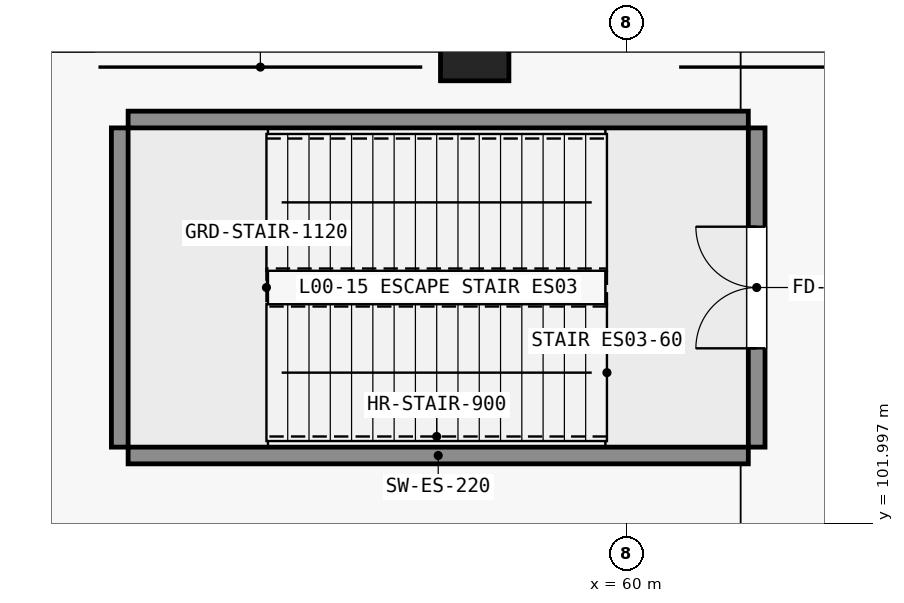
"""IFC4 building model, lengths in metres.
Left out: names, types, materials, properties, quantities, classifications, styles, units other than length and angle.
Written with IfcOpenShell. Run it as: python <this file> out.ifc"""

import sys

from ifc_helpers import new_model, si_unit, direction, frame, frame_2d, origin, origin_2d, place, context, subcontext, project, spatial, rectangle, extrude, element, fill, save


model = new_model("IFC4")
c1 = context("Model", 3, precision=1e-05, world=origin(), true_north=direction((0.0, 1.0)))
c2 = subcontext(c1, "Body", "Model", "MODEL_VIEW")
j1 = project(units=[si_unit("LENGTHUNIT", "METRE"), si_unit("PLANEANGLEUNIT", "RADIAN")], contexts=[c1])
p1 = place(None, origin())
s1 = spatial("IfcSite", under=j1, at=p1, CompositionType="ELEMENT")
p2 = place(p1, origin())
s2 = spatial("IfcBuilding", under=s1, at=p2, CompositionType="ELEMENT")
p3 = place(p2, origin())
s3 = spatial("IfcBuildingStorey", under=s2, at=p3, CompositionType="ELEMENT", Elevation=0.0)
p4 = place(p3, frame((58.0, 108.42, 0.0), z_axis=(0.0, 0.0, 1.0), x_axis=(1.0, 0.0, 0.0)))
e1 = element("IfcColumn", 1, at=p4, inside=s3, PredefinedType="PILASTER", context=c2, shape_type="SweptSolid", body=[
    extrude(rectangle(XDim=0.9, YDim=1.2, at=origin_2d()), origin(), (0.0, 0.0, 1.0), 6.0),
])
for number, where, z_axis, x_axis in (
    (2, (53.44, 102.89, 0.0), (0.0, 0.0, 1.0), (1.0, 0.0, 0.0)),
    (3, (53.44, 107.31, 0.0), (0.0, 0.0, 1.0), (1.0, 0.0, 0.0)),
):
    element("IfcWall", number, at=place(p3, frame(where, z_axis=z_axis, x_axis=x_axis)), inside=s3, PredefinedType="SHEAR", context=c2, shape_type="SweptSolid", body=[
        extrude(rectangle(XDim=8.16, YDim=0.22, at=frame_2d((4.08, 0.0))), origin(), (0.0, 0.0, 1.0), 6.0),
    ])
p5 = place(p3, frame((53.33, 103.0, 0.0), z_axis=(0.0, 0.0, 1.0), x_axis=(0.0, 1.0, 0.0)))
e4 = element("IfcWall", 4, at=p5, inside=s3, PredefinedType="SHEAR", context=c2, shape_type="SweptSolid", body=[
    extrude(rectangle(XDim=4.2, YDim=0.22, at=frame_2d((2.1, 0.0))), origin(), (0.0, 0.0, 1.0), 6.0),
])
p6 = place(p3, frame((61.71, 103.0, 0.0), z_axis=(0.0, 0.0, 1.0), x_axis=(0.0, 1.0, 0.0)))
e5 = element("IfcWall", 5, at=p6, inside=s3, PredefinedType="SHEAR", context=c2, shape_type="SweptSolid", body=[
    extrude(rectangle(XDim=4.2, YDim=0.22, at=frame_2d((2.1, 0.0))), origin(), (0.0, 0.0, 1.0), 6.0),
])
p7 = place(p6, frame((1.3, 0.0, 0.0)))
e6 = element("IfcOpeningElement", 6, at=p7, cuts=e5, PredefinedType="OPENING", context=c2, shape_type="SweptSolid", body=[
    extrude(rectangle(XDim=1.6, YDim=2.2, at=frame_2d((0.8, 1.1))), frame((0.0, 0.12, 0.0), z_axis=(0.0, -1.0, 0.0), x_axis=(1.0, 0.0, 0.0)), (0.0, 0.0, 1.0), 0.24),
])
p8 = place(p7, origin())
e7 = element("IfcDoor", 7, at=p8, inside=s3, OperationType="DOUBLE_DOOR_SINGLE_SWING", PredefinedType="DOOR", context=c2, shape_type="SweptSolid", body=[
    extrude(rectangle(XDim=1.6, YDim=2.2, at=frame_2d((0.8, 1.1))), frame((0.0, 0.025, 0.0), z_axis=(0.0, -1.0, 0.0), x_axis=(1.0, 0.0, 0.0)), (0.0, 0.0, 1.0), 0.05),
])
fill(e6, e7)
save(model, sys.argv[1])
